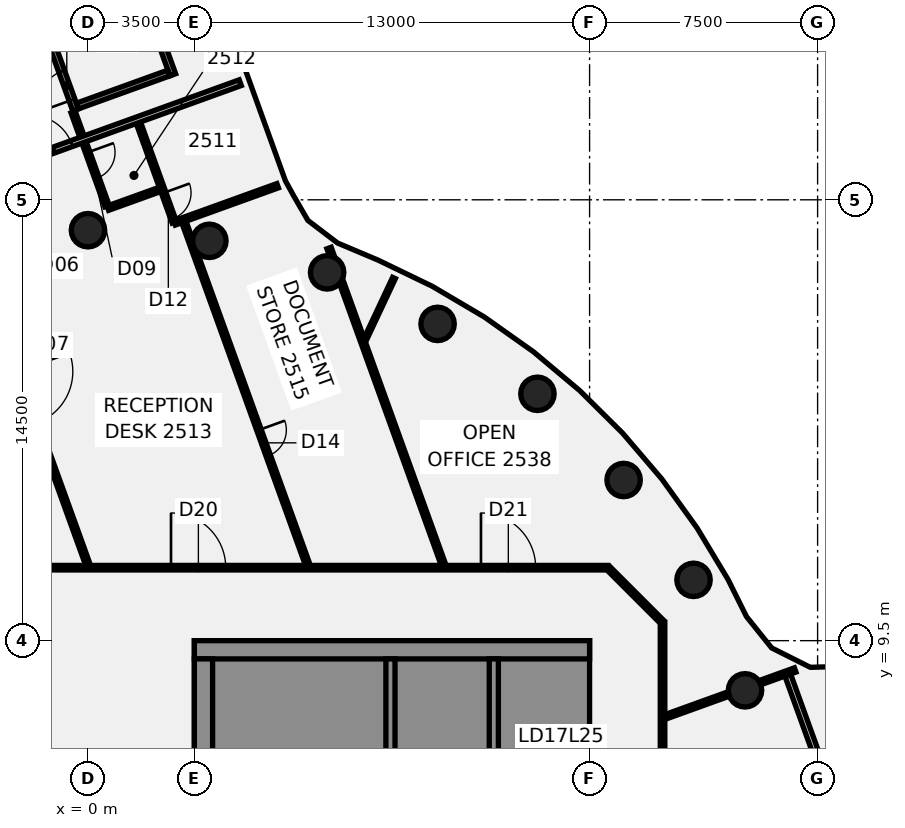
"""IFC4 building model, lengths in metres.
Left out: names, types, materials, properties, quantities, classifications, styles, units other than length and angle.
Written with IfcOpenShell. Run it as: python <this file> out.ifc"""

import sys

from ifc_helpers import new_model, si_unit, direction, frame, frame_2d, origin, origin_2d, place, context, subcontext, project, spatial, polyline, rectangle, circle, outline, extrude, element, fill, save


model = new_model("IFC4")
c1 = context("Model", 3, precision=1e-05, world=origin(), true_north=direction((0.0, 1.0)))
c2 = subcontext(c1, "Body", "Model", "MODEL_VIEW")
j1 = project(units=[si_unit("LENGTHUNIT", "METRE"), si_unit("PLANEANGLEUNIT", "RADIAN")], contexts=[c1])
p1 = place(None, origin())
s1 = spatial("IfcSite", under=j1, at=p1, CompositionType="ELEMENT")
p2 = place(p1, origin())
s2 = spatial("IfcBuilding", under=s1, at=p2, CompositionType="ELEMENT")
p3 = place(p2, frame((0.0, 0.0, 106.0)))
s3 = spatial("IfcBuildingStorey", under=s2, at=p3, CompositionType="ELEMENT", Elevation=106.0)
for number, where, z_axis, x_axis in (
    (1, (21.613, 7.866, -0.14), (0.0, 0.0, 1.0), (1.0, 0.0, 0.0)),
    (2, (19.919, 11.5, -0.14), (0.0, 0.0, 1.0), (1.0, 0.0, 0.0)),
    (3, (17.619, 14.784, -0.14), (0.0, 0.0, 1.0), (1.0, 0.0, 0.0)),
    (4, (14.784, 17.619, -0.14), (0.0, 0.0, 1.0), (1.0, 0.0, 0.0)),
    (5, (11.5, 19.919, -0.14), (0.0, 0.0, 1.0), (1.0, 0.0, 0.0)),
    (6, (7.866, 21.613, -0.14), (0.0, 0.0, 1.0), (1.0, 0.0, 0.0)),
    (7, (3.994, 22.651, -0.14), (0.0, 0.0, 1.0), (1.0, 0.0, 0.0)),
    (8, (0.0, 23.0, -0.14), (0.0, 0.0, 1.0), (1.0, 0.0, 0.0)),
):
    element("IfcColumn", number, at=place(p3, frame(where, z_axis=z_axis, x_axis=x_axis)), inside=s3, PredefinedType="COLUMN", context=c2, shape_type="SweptSolid", body=[
        extrude(circle(Radius=0.55, at=origin_2d()), origin(), (0.0, 0.0, 1.0), 3.75),
    ])
p4 = place(p3, frame((-3.24, 20.962, 0.0), z_axis=(0.0, 0.0, 1.0), x_axis=(0.339641321169, -0.940555034517, 0.0)))
e9 = element("IfcWall", 9, at=p4, inside=s3, PredefinedType="PARTITIONING", context=c2, shape_type="SweptSolid", body=[
    extrude(rectangle(XDim=9.545, YDim=0.15, at=frame_2d((4.772, 0.0))), origin(), (0.0, 0.0, 1.0), 3.01),
])
p5 = place(p4, frame((2.775, 0.0, 0.0)))
e10 = element("IfcOpeningElement", 10, at=p5, cuts=e9, PredefinedType="OPENING", context=c2, shape_type="SweptSolid", body=[
    extrude(rectangle(XDim=1.8, YDim=2.1, at=frame_2d((0.9, 1.05))), frame((0.0, 0.085, 0.0), z_axis=(0.0, -1.0, 0.0), x_axis=(1.0, 0.0, 0.0)), (0.0, 0.0, 1.0), 0.17),
])
p6 = place(p3, frame((-0.488, 26.884, 0.0), z_axis=(0.0, 0.0, 1.0), x_axis=(0.339611586075, -0.940565771546, 0.0)))
e11 = element("IfcWall", 11, at=p6, inside=s3, PredefinedType="PARTITIONING", context=c2, shape_type="SweptSolid", body=[
    extrude(rectangle(XDim=3.285, YDim=0.15, at=frame_2d((1.642, 0.0))), origin(), (0.0, 0.0, 1.0), 3.01),
])
p7 = place(p6, frame((1.409, 0.0, 0.0)))
e12 = element("IfcOpeningElement", 12, at=p7, cuts=e11, PredefinedType="OPENING", context=c2, shape_type="SweptSolid", body=[
    extrude(rectangle(XDim=0.9, YDim=2.1, at=frame_2d((0.45, 1.05))), frame((0.0, 0.085, 0.0), z_axis=(0.0, -1.0, 0.0), x_axis=(1.0, 0.0, 0.0)), (0.0, 0.0, 1.0), 0.17),
])
p8 = place(p3, frame((1.659, 26.533, 0.0), z_axis=(0.0, 0.0, 1.0), x_axis=(0.339618604602, -0.940563237326, 0.0)))
e13 = element("IfcWall", 13, at=p8, inside=s3, PredefinedType="PARTITIONING", context=c2, shape_type="SweptSolid", body=[
    extrude(rectangle(XDim=3.48, YDim=0.15, at=frame_2d((1.74, 0.0))), origin(), (0.0, 0.0, 1.0), 3.01),
])
p9 = place(p8, frame((2.45, 0.0, 0.0)))
e14 = element("IfcOpeningElement", 14, at=p9, cuts=e13, PredefinedType="OPENING", context=c2, shape_type="SweptSolid", body=[
    extrude(rectangle(XDim=0.9, YDim=2.1, at=frame_2d((0.45, 1.05))), frame((0.0, 0.085, 0.0), z_axis=(0.0, -1.0, 0.0), x_axis=(1.0, 0.0, 0.0)), (0.0, 0.0, 1.0), 0.17),
])
p10 = place(p3, frame((3.157, 23.268, 0.0), z_axis=(0.0, 0.0, 1.0), x_axis=(0.339552440638, -0.940587125181, 0.0)))
e15 = element("IfcWall", 15, at=p10, inside=s3, PredefinedType="PARTITIONING", context=c2, shape_type="SweptSolid", body=[
    extrude(rectangle(XDim=11.996, YDim=0.15, at=frame_2d((5.998, 0.0))), origin(), (0.0, 0.0, 1.0), 3.01),
])
p11 = place(p10, frame((7.27, 0.0, 0.0)))
e16 = element("IfcOpeningElement", 16, at=p11, cuts=e15, PredefinedType="OPENING", context=c2, shape_type="SweptSolid", body=[
    extrude(rectangle(XDim=0.9, YDim=2.1, at=frame_2d((0.45, 1.05))), frame((0.0, 0.085, 0.0), z_axis=(0.0, -1.0, 0.0), x_axis=(1.0, 0.0, 0.0)), (0.0, 0.0, 1.0), 0.17),
])
p12 = place(p3, frame((7.93, 22.415, 0.0), z_axis=(0.0, 0.0, 1.0), x_axis=(0.339939970845, -0.940447136325, 0.0)))
e17 = element("IfcWall", 17, at=p12, inside=s3, PredefinedType="PARTITIONING", context=c2, shape_type="SweptSolid", body=[
    extrude(rectangle(XDim=0.304, YDim=0.15, at=frame_2d((0.152, 0.0))), origin(), (0.0, 0.0, 1.0), 3.01),
])
p13 = place(p3, frame((8.329, 21.31, 0.0), z_axis=(0.0, 0.0, 1.0), x_axis=(0.339628731731, -0.94055958056, 0.0)))
e18 = element("IfcWall", 18, at=p13, inside=s3, PredefinedType="PARTITIONING", context=c2, shape_type="SweptSolid", body=[
    extrude(rectangle(XDim=9.915, YDim=0.15, at=frame_2d((4.958, 0.0))), origin(), (0.0, 0.0, 1.0), 3.01),
])
p14 = place(p3, frame((23.019, 8.368, 0.0), z_axis=(0.0, 0.0, 1.0), x_axis=(0.339687484061, -0.940538363477, 0.0)))
e19 = element("IfcWall", 19, at=p14, inside=s3, PredefinedType="PARTITIONING", context=c2, shape_type="SweptSolid", body=[
    extrude(rectangle(XDim=14.224, YDim=0.2, at=frame_2d((7.112, 0.0))), origin(), (0.0, 0.0, 1.0), 3.01),
])
p15 = place(p14, frame((6.625, 0.0, 0.0)))
e20 = element("IfcOpeningElement", 20, at=p15, cuts=e19, PredefinedType="OPENING", context=c2, shape_type="SweptSolid", body=[
    extrude(rectangle(XDim=1.4, YDim=2.1, at=frame_2d((0.7, 1.05))), frame((0.0, 0.11, 0.0), z_axis=(0.0, -1.0, 0.0), x_axis=(1.0, 0.0, 0.0)), (0.0, 0.0, 1.0), 0.22),
])
p16 = place(p3, frame((17.128, 11.872, 0.0), z_axis=(0.0, 0.0, 1.0), x_axis=(0.707106781187, -0.707106781187, 0.0)))
e21 = element("IfcWall", 21, at=p16, inside=s3, PredefinedType="PARTITIONING", context=c2, shape_type="SweptSolid", body=[
    extrude(rectangle(XDim=2.465, YDim=0.15, at=frame_2d((1.232, 0.0))), origin(), (0.0, 0.0, 1.0), 3.01),
])
p17 = place(p3, frame((-17.065, 11.9, 0.0), z_axis=(0.0, 0.0, 1.0), x_axis=(1.0, 0.0, 0.0)))
e22 = element("IfcWall", 22, at=p17, inside=s3, PredefinedType="PARTITIONING", context=c2, shape_type="SweptSolid", body=[
    extrude(rectangle(XDim=34.165, YDim=0.15, at=frame_2d((17.083, 0.0))), origin(), (0.0, 0.0, 1.0), 3.01),
])
p18 = place(p17, frame((19.797, 0.0, 0.0)))
e23 = element("IfcOpeningElement", 23, at=p18, cuts=e22, PredefinedType="OPENING", context=c2, shape_type="SweptSolid", body=[
    extrude(rectangle(XDim=1.8, YDim=2.1, at=frame_2d((0.9, 1.05))), frame((0.0, 0.085, 0.0), z_axis=(0.0, -1.0, 0.0), x_axis=(1.0, 0.0, 0.0)), (0.0, 0.0, 1.0), 0.17),
])
p19 = place(p17, frame((29.992, 0.0, 0.0)))
e24 = element("IfcOpeningElement", 24, at=p19, cuts=e22, PredefinedType="OPENING", context=c2, shape_type="SweptSolid", body=[
    extrude(rectangle(XDim=1.8, YDim=2.1, at=frame_2d((0.9, 1.05))), frame((0.0, 0.085, 0.0), z_axis=(0.0, -1.0, 0.0), x_axis=(1.0, 0.0, 0.0)), (0.0, 0.0, 1.0), 0.17),
])
p20 = place(p17, frame((5.515, 0.0, 0.0)))
e25 = element("IfcOpeningElement", 25, at=p20, cuts=e22, PredefinedType="OPENING", context=c2, shape_type="SweptSolid", body=[
    extrude(rectangle(XDim=1.8, YDim=2.1, at=frame_2d((0.9, 1.05))), frame((0.0, 0.085, 0.0), z_axis=(0.0, -1.0, 0.0), x_axis=(1.0, 0.0, 0.0)), (0.0, 0.0, 1.0), 0.17),
])
p21 = place(p3, frame((-8.387, 23.012, 0.0), z_axis=(0.0, 0.0, 1.0), x_axis=(0.94050598111, 0.339777132096, 0.0)))
e26 = element("IfcWall", 26, at=p21, inside=s3, PredefinedType="PARTITIONING", context=c2, shape_type="SweptSolid", body=[
    extrude(rectangle(XDim=14.244, YDim=0.2, at=frame_2d((7.122, 0.0))), origin(), (0.0, 0.0, 1.0), 3.01),
])
p22 = place(p21, frame((6.946, 0.0, 0.0)))
e27 = element("IfcOpeningElement", 27, at=p22, cuts=e26, PredefinedType="OPENING", context=c2, shape_type="SweptSolid", body=[
    extrude(rectangle(XDim=1.4, YDim=2.1, at=frame_2d((0.7, 1.05))), frame((0.0, 0.11, 0.0), z_axis=(0.0, -1.0, 0.0), x_axis=(1.0, 0.0, 0.0)), (0.0, 0.0, 1.0), 0.22),
])
p23 = place(p3, frame((2.849, 23.239, 0.0), z_axis=(0.0, 0.0, 1.0), x_axis=(0.940644601106, 0.339393185569, 0.0)))
e28 = element("IfcWall", 28, at=p23, inside=s3, PredefinedType="PARTITIONING", context=c2, shape_type="SweptSolid", body=[
    extrude(rectangle(XDim=3.605, YDim=0.15, at=frame_2d((1.803, 0.0))), origin(), (0.0, 0.0, 1.0), 3.01),
])
p24 = place(p3, frame((0.653, 23.723, 0.0), z_axis=(0.0, 0.0, 1.0), x_axis=(0.940696265355, 0.339249961454, 0.0)))
e29 = element("IfcWall", 29, at=p24, inside=s3, PredefinedType="PARTITIONING", context=c2, shape_type="SweptSolid", body=[
    extrude(rectangle(XDim=1.825, YDim=0.15, at=frame_2d((0.913, 0.0))), origin(), (0.0, 0.0, 1.0), 3.01),
])
p25 = place(p3, frame((18.985, 6.992, 0.0), z_axis=(0.0, 0.0, 1.0), x_axis=(0.940573308352, 0.339590711911, 0.0)))
e30 = element("IfcWall", 30, at=p25, inside=s3, PredefinedType="PARTITIONING", context=c2, shape_type="SweptSolid", body=[
    extrude(rectangle(XDim=2.232, YDim=0.15, at=frame_2d((1.116, 0.0))), origin(), (0.0, 0.0, 1.0), 3.01),
])
p26 = place(p3, frame((22.105, 8.118, 0.0), z_axis=(0.0, 0.0, 1.0), x_axis=(0.940550376559, 0.339654219986, 0.0)))
e31 = element("IfcWall", 31, at=p26, inside=s3, PredefinedType="PARTITIONING", context=c2, shape_type="SweptSolid", body=[
    extrude(rectangle(XDim=1.23, YDim=0.15, at=frame_2d((0.615, 0.0))), origin(), (0.0, 0.0, 1.0), 3.01),
])
p27 = place(p3, frame((9.118, 19.408, 0.0), z_axis=(0.0, 0.0, 1.0), x_axis=(0.425122898743, 0.905135636778, 0.0)))
e32 = element("IfcWall", 32, at=p27, inside=s3, PredefinedType="PARTITIONING", context=c2, shape_type="SweptSolid", body=[
    extrude(rectangle(XDim=2.233, YDim=0.1, at=frame_2d((1.116, 0.0))), origin(), (0.0, 0.0, 1.0), 3.01),
])
p28 = place(p3, frame((18.9, -10.1, 0.0), z_axis=(0.0, 0.0, 1.0), x_axis=(0.0, 1.0, 0.0)))
e33 = element("IfcWall", 33, at=p28, inside=s3, PredefinedType="PARTITIONING", context=c2, shape_type="SweptSolid", body=[
    extrude(rectangle(XDim=20.2, YDim=0.15, at=frame_2d((10.1, 0.0))), origin(), (0.0, 0.0, 1.0), 3.01),
])
p29 = place(p28, frame((8.966, 0.0, 0.0)))
e34 = element("IfcOpeningElement", 34, at=p29, cuts=e33, PredefinedType="OPENING", context=c2, shape_type="SweptSolid", body=[
    extrude(rectangle(XDim=1.8, YDim=2.1, at=frame_2d((0.9, 1.05))), frame((0.0, 0.085, 0.0), z_axis=(0.0, -1.0, 0.0), x_axis=(1.0, 0.0, 0.0)), (0.0, 0.0, 1.0), 0.17),
])
p30 = place(p28, frame((13.796, 0.0, 0.0)))
e35 = element("IfcOpeningElement", 35, at=p30, cuts=e33, PredefinedType="OPENING", context=c2, shape_type="SweptSolid", body=[
    extrude(rectangle(XDim=0.9, YDim=2.1, at=frame_2d((0.45, 1.05))), frame((0.0, 0.085, 0.0), z_axis=(0.0, -1.0, 0.0), x_axis=(1.0, 0.0, 0.0)), (0.0, 0.0, 1.0), 0.17),
])
p31 = place(p3, origin())
e36 = element("IfcWall", 36, at=p31, inside=s3, PredefinedType="SHEAR", context=c2, shape_type="SweptSolid", body=[
    extrude(outline(polyline([(13.5, -8.9), (15.9, -8.9), (16.5, -8.9), (16.5, 8.9), (15.9, 8.9), (13.5, 8.9), (13.5, 8.125), (15.9, 8.125), (15.9, 5.625), (13.5, 5.625), (13.5, 5.375), (15.9, 5.375), (15.9, 2.875), (13.5, 2.875), (13.5, 2.625), (15.9, 2.625), (15.9, 0.125), (13.5, 0.125), (13.5, -0.125), (15.9, -0.125), (15.9, -2.625), (13.5, -2.625), (13.5, -2.875), (15.9, -2.875), (15.9, -5.375), (13.5, -5.375), (13.5, -5.625), (15.9, -5.625), (15.9, -8.125), (13.5, -8.125), (13.5, -8.9)])), origin(), (0.0, 0.0, 1.0), 3.61),
])
p32 = place(p3, frame((16.5, 9.2, 0.0), z_axis=(0.0, 0.0, 1.0), x_axis=(-1.0, 0.0, 0.0)))
e37 = element("IfcWall", 37, at=p32, inside=s3, PredefinedType="SHEAR", context=c2, shape_type="SweptSolid", body=[
    extrude(rectangle(XDim=13.0, YDim=0.6, at=frame_2d((6.5, 0.0))), origin(), (0.0, 0.0, 1.0), 3.61),
])
p33 = place(p3, origin())
e38 = element("IfcWall", 38, at=p33, inside=s3, PredefinedType="SHEAR", context=c2, shape_type="SweptSolid", body=[
    extrude(outline(polyline([(9.8, -5.375), (7.5, -5.375), (7.5, -2.875), (9.8, -2.875), (9.8, -2.625), (7.5, -2.625), (7.5, -0.125), (9.8, -0.125), (9.8, 0.125), (7.5, 0.125), (7.5, 2.625), (9.8, 2.625), (9.8, 2.875), (7.5, 2.875), (7.5, 5.375), (9.8, 5.375), (9.8, 5.625), (7.5, 5.625), (7.5, 8.125), (9.8, 8.125), (9.8, 8.9), (7.5, 8.9), (7.2, 8.9), (7.2, -5.625), (7.5, -5.625), (9.8, -5.625), (9.8, -5.375)])), origin(), (0.0, 0.0, 1.0), 3.61),
])
p34 = place(p3, frame((13.35, -8.9, 0.0), z_axis=(0.0, 0.0, 1.0), x_axis=(0.0, 1.0, 0.0)))
e39 = element("IfcWall", 39, at=p34, inside=s3, PredefinedType="SHEAR", context=c2, shape_type="SweptSolid", body=[
    extrude(rectangle(XDim=17.8, YDim=0.3, at=frame_2d((8.9, 0.0))), origin(), (0.0, 0.0, 1.0), 3.61),
])
p35 = place(p34, frame((1.325, 0.0, 0.0)))
e40 = element("IfcOpeningElement", 40, at=p35, cuts=e39, PredefinedType="OPENING", context=c2, shape_type="SweptSolid", body=[
    extrude(rectangle(XDim=1.4, YDim=2.1, at=frame_2d((0.7, 1.05))), frame((0.0, 0.16, 0.0), z_axis=(0.0, -1.0, 0.0), x_axis=(1.0, 0.0, 0.0)), (0.0, 0.0, 1.0), 0.32),
])
p36 = place(p34, frame((4.225, 0.0, 0.0)))
e41 = element("IfcOpeningElement", 41, at=p36, cuts=e39, PredefinedType="OPENING", context=c2, shape_type="SweptSolid", body=[
    extrude(rectangle(XDim=1.1, YDim=2.1, at=frame_2d((0.55, 1.05))), frame((0.0, 0.16, 0.0), z_axis=(0.0, -1.0, 0.0), x_axis=(1.0, 0.0, 0.0)), (0.0, 0.0, 1.0), 0.32),
])
p37 = place(p34, frame((6.975, 0.0, 0.0)))
e42 = element("IfcOpeningElement", 42, at=p37, cuts=e39, PredefinedType="OPENING", context=c2, shape_type="SweptSolid", body=[
    extrude(rectangle(XDim=1.1, YDim=2.1, at=frame_2d((0.55, 1.05))), frame((0.0, 0.16, 0.0), z_axis=(0.0, -1.0, 0.0), x_axis=(1.0, 0.0, 0.0)), (0.0, 0.0, 1.0), 0.32),
])
p38 = place(p34, frame((9.725, 0.0, 0.0)))
e43 = element("IfcOpeningElement", 43, at=p38, cuts=e39, PredefinedType="OPENING", context=c2, shape_type="SweptSolid", body=[
    extrude(rectangle(XDim=1.1, YDim=2.1, at=frame_2d((0.55, 1.05))), frame((0.0, 0.16, 0.0), z_axis=(0.0, -1.0, 0.0), x_axis=(1.0, 0.0, 0.0)), (0.0, 0.0, 1.0), 0.32),
])
p39 = place(p34, frame((12.475, 0.0, 0.0)))
e44 = element("IfcOpeningElement", 44, at=p39, cuts=e39, PredefinedType="OPENING", context=c2, shape_type="SweptSolid", body=[
    extrude(rectangle(XDim=1.1, YDim=2.1, at=frame_2d((0.55, 1.05))), frame((0.0, 0.16, 0.0), z_axis=(0.0, -1.0, 0.0), x_axis=(1.0, 0.0, 0.0)), (0.0, 0.0, 1.0), 0.32),
])
p40 = place(p3, frame((9.95, -8.9, 0.0), z_axis=(0.0, 0.0, 1.0), x_axis=(0.0, 1.0, 0.0)))
e45 = element("IfcWall", 45, at=p40, inside=s3, PredefinedType="SHEAR", context=c2, shape_type="SweptSolid", body=[
    extrude(rectangle(XDim=17.8, YDim=0.3, at=frame_2d((8.9, 0.0))), origin(), (0.0, 0.0, 1.0), 3.61),
])
p41 = place(p3, frame((3.8, -8.9, 0.0), z_axis=(0.0, 0.0, 1.0), x_axis=(0.0, 1.0, 0.0)))
e46 = element("IfcWall", 46, at=p41, inside=s3, PredefinedType="SHEAR", context=c2, shape_type="SweptSolid", body=[
    extrude(rectangle(XDim=17.8, YDim=0.6, at=frame_2d((8.9, 0.0))), origin(), (0.0, 0.0, 1.0), 3.61),
])
p42 = place(p41, frame((1.25, 0.0, 0.0)))
e47 = element("IfcOpeningElement", 47, at=p42, cuts=e46, PredefinedType="OPENING", context=c2, shape_type="SweptSolid", body=[
    extrude(rectangle(XDim=1.8, YDim=2.1, at=frame_2d((0.9, 1.05))), frame((0.0, 0.31, 0.0), z_axis=(0.0, -1.0, 0.0), x_axis=(1.0, 0.0, 0.0)), (0.0, 0.0, 1.0), 0.62),
])
p43 = place(p41, frame((13.8, 0.0, 0.0)))
e48 = element("IfcOpeningElement", 48, at=p43, cuts=e46, PredefinedType="OPENING", context=c2, shape_type="SweptSolid", body=[
    extrude(rectangle(XDim=1.0, YDim=2.1, at=frame_2d((0.5, 1.05))), frame((0.0, 0.31, 0.0), z_axis=(0.0, -1.0, 0.0), x_axis=(1.0, 0.0, 0.0)), (0.0, 0.0, 1.0), 0.62),
])
p44 = place(p3, frame((-0.407, 26.956, -0.14), z_axis=(0.0, 0.0, 1.0), x_axis=(-0.339579991126, 0.940577178985, 0.0)))
e49 = element("IfcWall", 49, at=p44, inside=s3, PredefinedType="SHEAR", context=c2, shape_type="SweptSolid", body=[
    extrude(rectangle(XDim=6.7, YDim=0.2, at=frame_2d((3.35, 0.0))), origin(), (0.0, 0.0, 1.0), 3.15),
])
p45 = place(p44, frame((0.35, 0.0, 0.0)))
e50 = element("IfcOpeningElement", 50, at=p45, cuts=e49, PredefinedType="OPENING", context=c2, shape_type="SweptSolid", body=[
    extrude(rectangle(XDim=1.0, YDim=2.1, at=frame_2d((0.5, 1.05))), frame((0.0, 0.11, 0.0), z_axis=(0.0, -1.0, 0.0), x_axis=(1.0, 0.0, 0.0)), (0.0, 0.0, 1.0), 0.22),
])
p46 = place(p3, frame((2.791, 28.111, -0.14), z_axis=(0.0, 0.0, 1.0), x_axis=(-0.339579991126, 0.940577178985, 0.0)))
e51 = element("IfcWall", 51, at=p46, inside=s3, PredefinedType="SHEAR", context=c2, shape_type="SweptSolid", body=[
    extrude(rectangle(XDim=6.7, YDim=0.2, at=frame_2d((3.35, 0.0))), origin(), (0.0, 0.0, 1.0), 3.15),
])
p47 = place(p3, frame((2.663, 28.171, -0.14), z_axis=(0.0, 0.0, 1.0), x_axis=(-0.940572854963, -0.33959196767, 0.0)))
e52 = element("IfcWall", 52, at=p47, inside=s3, PredefinedType="SHEAR", context=c2, shape_type="SweptSolid", body=[
    extrude(rectangle(XDim=3.2, YDim=0.2, at=frame_2d((1.6, 0.0))), origin(), (0.0, 0.0, 1.0), 3.15),
])
p48 = place(p7, origin())
e53 = element("IfcDoor", 53, at=p48, inside=s3, OperationType="SINGLE_SWING_LEFT", PredefinedType="DOOR", context=c2, shape_type="SweptSolid", body=[
    extrude(rectangle(XDim=0.9, YDim=2.1, at=frame_2d((0.45, 1.05))), frame((0.0, 0.025, 0.0), z_axis=(0.0, -1.0, 0.0), x_axis=(1.0, 0.0, 0.0)), (0.0, 0.0, 1.0), 0.05),
])
fill(e12, e53)
p49 = place(p9, origin())
e54 = element("IfcDoor", 54, at=p49, inside=s3, OperationType="SINGLE_SWING_LEFT", PredefinedType="DOOR", context=c2, shape_type="SweptSolid", body=[
    extrude(rectangle(XDim=0.9, YDim=2.1, at=frame_2d((0.45, 1.05))), frame((0.0, 0.025, 0.0), z_axis=(0.0, -1.0, 0.0), x_axis=(1.0, 0.0, 0.0)), (0.0, 0.0, 1.0), 0.05),
])
fill(e14, e54)
p50 = place(p11, origin())
e55 = element("IfcDoor", 55, at=p50, inside=s3, OperationType="SINGLE_SWING_LEFT", PredefinedType="DOOR", context=c2, shape_type="SweptSolid", body=[
    extrude(rectangle(XDim=0.9, YDim=2.1, at=frame_2d((0.45, 1.05))), frame((0.0, 0.025, 0.0), z_axis=(0.0, -1.0, 0.0), x_axis=(1.0, 0.0, 0.0)), (0.0, 0.0, 1.0), 0.05),
])
fill(e16, e55)
p51 = place(p18, frame((1.8, 0.0, 0.0), z_axis=(0.0, 0.0, 1.0), x_axis=(-1.0, 0.0, 0.0)))
e56 = element("IfcDoor", 56, at=p51, inside=s3, OperationType="DOUBLE_DOOR_SINGLE_SWING", PredefinedType="DOOR", context=c2, shape_type="SweptSolid", body=[
    extrude(rectangle(XDim=1.8, YDim=2.1, at=frame_2d((0.9, 1.05))), frame((0.0, 0.025, 0.0), z_axis=(0.0, -1.0, 0.0), x_axis=(1.0, 0.0, 0.0)), (0.0, 0.0, 1.0), 0.05),
])
fill(e23, e56)
p52 = place(p19, origin())
e57 = element("IfcDoor", 57, at=p52, inside=s3, OperationType="DOUBLE_DOOR_SINGLE_SWING", PredefinedType="DOOR", context=c2, shape_type="SweptSolid", body=[
    extrude(rectangle(XDim=1.8, YDim=2.1, at=frame_2d((0.9, 1.05))), frame((0.0, 0.025, 0.0), z_axis=(0.0, -1.0, 0.0), x_axis=(1.0, 0.0, 0.0)), (0.0, 0.0, 1.0), 0.05),
])
fill(e24, e57)
p53 = place(p22, frame((1.4, 0.0, 0.0), z_axis=(0.0, 0.0, 1.0), x_axis=(-1.0, 0.0, 0.0)))
e58 = element("IfcDoor", 58, at=p53, inside=s3, OperationType="DOUBLE_DOOR_SINGLE_SWING", PredefinedType="DOOR", context=c2, shape_type="SweptSolid", body=[
    extrude(rectangle(XDim=1.4, YDim=2.1, at=frame_2d((0.7, 1.05))), frame((0.0, 0.025, 0.0), z_axis=(0.0, -1.0, 0.0), x_axis=(1.0, 0.0, 0.0)), (0.0, 0.0, 1.0), 0.05),
])
fill(e27, e58)
p54 = place(p45, origin())
e59 = element("IfcDoor", 59, at=p54, inside=s3, OperationType="SINGLE_SWING_LEFT", PredefinedType="DOOR", context=c2, shape_type="SweptSolid", body=[
    extrude(rectangle(XDim=1.0, YDim=2.1, at=frame_2d((0.5, 1.05))), frame((0.0, 0.025, 0.0), z_axis=(0.0, -1.0, 0.0), x_axis=(1.0, 0.0, 0.0)), (0.0, 0.0, 1.0), 0.05),
])
fill(e50, e59)
save(model, sys.argv[1])
